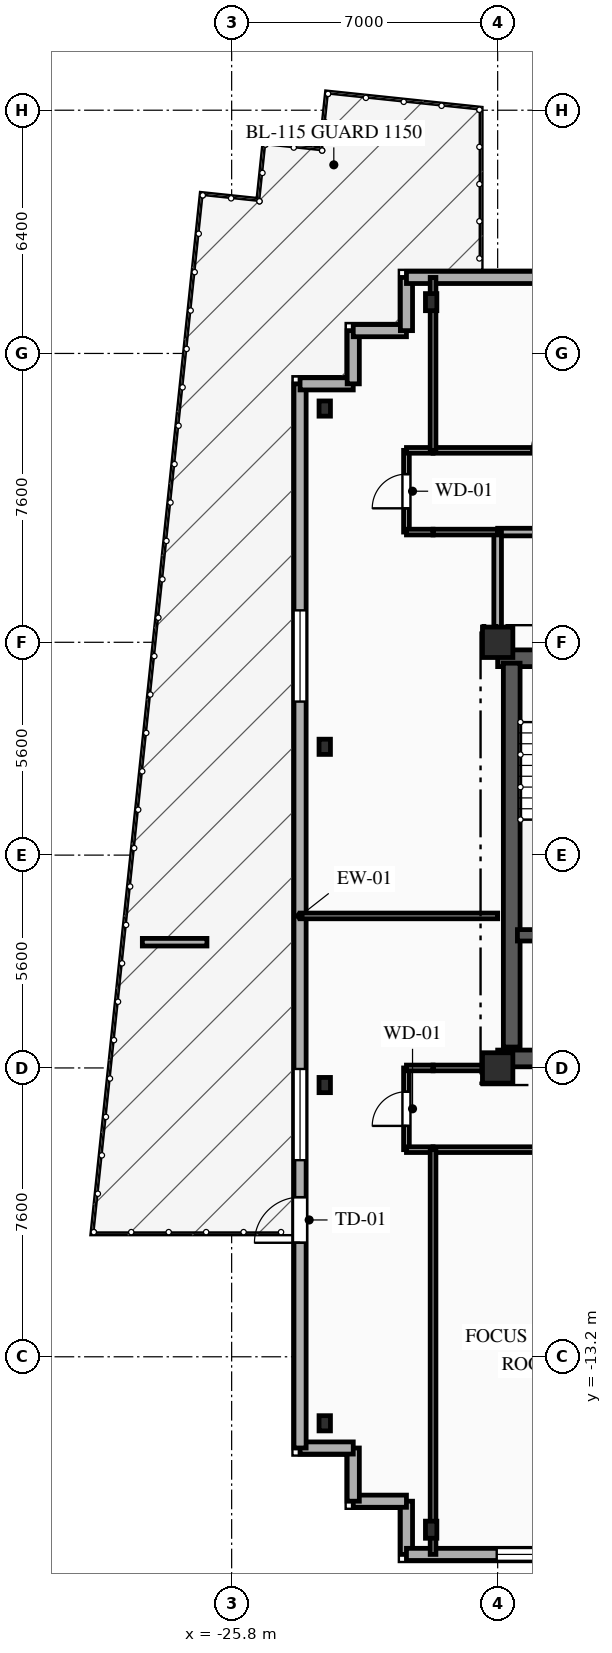
"""IFC4 building model, lengths in metres.
Left out: names, types, materials, properties, quantities, classifications, styles, units other than length and angle.
Written with IfcOpenShell. Run it as: python <this file> out.ifc"""

import sys

from ifc_helpers import new_model, si_unit, direction, frame, frame_2d, origin, origin_2d, place, context, subcontext, project, spatial, rectangle, i_section, extrude, element, fill, save


model = new_model("IFC4")
c1 = context("Model", 3, precision=1e-05, world=origin(), true_north=direction((0.0, 1.0)))
c2 = subcontext(c1, "Body", "Model", "MODEL_VIEW")
j1 = project(units=[si_unit("LENGTHUNIT", "METRE"), si_unit("PLANEANGLEUNIT", "RADIAN")], contexts=[c1])
p1 = place(None, origin())
s1 = spatial("IfcSite", under=j1, at=p1, CompositionType="ELEMENT")
p2 = place(p1, origin())
s2 = spatial("IfcBuilding", under=s1, at=p2, CompositionType="ELEMENT")
p3 = place(p2, frame((0.0, 0.0, 228.3)))
s3 = spatial("IfcBuildingStorey", under=s2, at=p3, CompositionType="ELEMENT", Elevation=228.3)
for number, where, z_axis, x_axis in (
    (1, (-18.8, -5.6, 0.0), (0.0, 0.0, 1.0), (1.0, 0.0, 0.0)),
    (2, (-18.8, 5.6, 0.0), (0.0, 0.0, 1.0), (1.0, 0.0, 0.0)),
):
    element("IfcColumn", number, at=place(p3, frame(where, z_axis=z_axis, x_axis=x_axis)), inside=s3, PredefinedType="COLUMN", context=c2, shape_type="SweptSolid", body=[
        extrude(rectangle(XDim=0.8, YDim=0.8, at=origin_2d()), origin(), (0.0, 0.0, 1.0), 3.35),
    ])
for number, where, z_axis, x_axis in (
    (3, (-20.55, -17.75, 0.0), (0.0, 0.0, 1.0), (1.0, 0.0, 0.0)),
    (4, (-20.55, 14.55, 0.0), (0.0, 0.0, 1.0), (1.0, 0.0, 0.0)),
):
    element("IfcColumn", number, at=place(p3, frame(where, z_axis=z_axis, x_axis=x_axis)), inside=s3, PredefinedType="COLUMN", context=c2, shape_type="SweptSolid", body=[
        extrude(i_section(OverallWidth=0.3, OverallDepth=0.45, WebThickness=0.014, FlangeThickness=0.026, FilletRadius=0.027, at=origin_2d()), origin(), (0.0, 0.0, 1.0), 3.35),
    ])
for number, where, z_axis, x_axis in (
    (5, (-23.35, 11.75, 0.0), (0.0, 0.0, 1.0), (1.0, 0.0, 0.0)),
    (6, (-23.35, 2.85, 0.0), (0.0, 0.0, 1.0), (1.0, 0.0, 0.0)),
    (7, (-23.35, -6.05, 0.0), (0.0, 0.0, 1.0), (1.0, 0.0, 0.0)),
    (8, (-23.35, -14.95, 0.0), (0.0, 0.0, 1.0), (1.0, 0.0, 0.0)),
):
    element("IfcColumn", number, at=place(p3, frame(where, z_axis=z_axis, x_axis=x_axis)), inside=s3, PredefinedType="COLUMN", context=c2, shape_type="SweptSolid", body=[
        extrude(i_section(OverallWidth=0.3, OverallDepth=0.4, WebThickness=0.013, FlangeThickness=0.024, FilletRadius=0.027, at=origin_2d()), origin(), (0.0, 0.0, 1.0), 3.35),
    ])
p4 = place(p3, frame((-21.2, -18.4, 0.0), z_axis=(0.0, 0.0, 1.0), x_axis=(0.0, 1.0, 0.0)))
e9 = element("IfcWall", 9, at=p4, inside=s3, PredefinedType="SOLIDWALL", context=c2, shape_type="SweptSolid", body=[
    extrude(rectangle(XDim=1.4, YDim=0.32, at=frame_2d((0.7, 0.0))), origin(), (0.0, 0.0, 1.0), 3.04),
])
p5 = place(p3, frame((-21.2, -17.0, 0.0), z_axis=(0.0, 0.0, 1.0), x_axis=(-1.0, 0.0, 0.0)))
e10 = element("IfcWall", 10, at=p5, inside=s3, PredefinedType="SOLIDWALL", context=c2, shape_type="SweptSolid", body=[
    extrude(rectangle(XDim=1.4, YDim=0.32, at=frame_2d((0.7, 0.0))), origin(), (0.0, 0.0, 1.0), 3.04),
])
for number, where, z_axis, x_axis in (
    (11, (-22.6, -17.0, 0.0), (0.0, 0.0, 1.0), (0.0, 1.0, 0.0)),
    (12, (-22.6, -15.6, 0.0), (0.0, 0.0, 1.0), (-1.0, 0.0, 0.0)),
):
    element("IfcWall", number, at=place(p3, frame(where, z_axis=z_axis, x_axis=x_axis)), inside=s3, PredefinedType="SOLIDWALL", context=c2, shape_type="SweptSolid", body=[
        extrude(rectangle(XDim=1.4, YDim=0.32, at=frame_2d((0.7, 0.0))), origin(), (0.0, 0.0, 1.0), 3.04),
    ])
p6 = place(p3, frame((-24.0, -15.6, 0.0), z_axis=(0.0, 0.0, 1.0), x_axis=(0.0, 1.0, 0.0)))
e13 = element("IfcWall", 13, at=p6, inside=s3, PredefinedType="SOLIDWALL", context=c2, shape_type="SweptSolid", body=[
    extrude(rectangle(XDim=28.0, YDim=0.32, at=frame_2d((14.0, 0.0))), origin(), (0.0, 0.0, 1.0), 3.04),
])
p7 = place(p6, frame((5.4, 0.0, 0.0)))
e14 = element("IfcOpeningElement", 14, at=p7, cuts=e13, PredefinedType="OPENING", context=c2, shape_type="SweptSolid", body=[
    extrude(rectangle(XDim=1.2, YDim=2.2, at=frame_2d((0.6, 1.1))), frame((0.0, 0.17, 0.0), z_axis=(0.0, -1.0, 0.0), x_axis=(1.0, 0.0, 0.0)), (0.0, 0.0, 1.0), 0.34),
])
p8 = place(p6, frame((7.573, 0.0, 0.85)))
e15 = element("IfcOpeningElement", 15, at=p8, cuts=e13, PredefinedType="OPENING", context=c2, shape_type="SweptSolid", body=[
    extrude(rectangle(XDim=2.4, YDim=1.95, at=frame_2d((1.2, 0.975))), frame((0.0, 0.17, 0.0), z_axis=(0.0, -1.0, 0.0), x_axis=(1.0, 0.0, 0.0)), (0.0, 0.0, 1.0), 0.34),
])
p9 = place(p6, frame((19.64, 0.0, 0.85)))
e16 = element("IfcOpeningElement", 16, at=p9, cuts=e13, PredefinedType="OPENING", context=c2, shape_type="SweptSolid", body=[
    extrude(rectangle(XDim=2.4, YDim=1.95, at=frame_2d((1.2, 0.975))), frame((0.0, 0.17, 0.0), z_axis=(0.0, -1.0, 0.0), x_axis=(1.0, 0.0, 0.0)), (0.0, 0.0, 1.0), 0.34),
])
p10 = place(p3, frame((-24.0, 12.4, 0.0), z_axis=(0.0, 0.0, 1.0), x_axis=(1.0, 0.0, 0.0)))
e17 = element("IfcWall", 17, at=p10, inside=s3, PredefinedType="SOLIDWALL", context=c2, shape_type="SweptSolid", body=[
    extrude(rectangle(XDim=1.4, YDim=0.32, at=frame_2d((0.7, 0.0))), origin(), (0.0, 0.0, 1.0), 3.04),
])
for number, where, z_axis, x_axis in (
    (18, (-22.6, 12.4, 0.0), (0.0, 0.0, 1.0), (0.0, 1.0, 0.0)),
    (19, (-22.6, 13.8, 0.0), (0.0, 0.0, 1.0), (1.0, 0.0, 0.0)),
):
    element("IfcWall", number, at=place(p3, frame(where, z_axis=z_axis, x_axis=x_axis)), inside=s3, PredefinedType="SOLIDWALL", context=c2, shape_type="SweptSolid", body=[
        extrude(rectangle(XDim=1.4, YDim=0.32, at=frame_2d((0.7, 0.0))), origin(), (0.0, 0.0, 1.0), 3.04),
    ])
p11 = place(p3, frame((-21.2, 13.8, 0.0), z_axis=(0.0, 0.0, 1.0), x_axis=(0.0, 1.0, 0.0)))
e20 = element("IfcWall", 20, at=p11, inside=s3, PredefinedType="SOLIDWALL", context=c2, shape_type="SweptSolid", body=[
    extrude(rectangle(XDim=1.4, YDim=0.32, at=frame_2d((0.7, 0.0))), origin(), (0.0, 0.0, 1.0), 3.04),
])
p12 = place(p3, frame((-21.2, 15.2, 0.0), z_axis=(0.0, 0.0, 1.0), x_axis=(1.0, 0.0, 0.0)))
e21 = element("IfcWall", 21, at=p12, inside=s3, PredefinedType="SOLIDWALL", context=c2, shape_type="SweptSolid", body=[
    extrude(rectangle(XDim=42.0, YDim=0.32, at=frame_2d((21.0, 0.0))), origin(), (0.0, 0.0, 1.0), 3.04),
])
p13 = place(p12, frame((5.015, 0.0, 0.85)))
e22 = element("IfcOpeningElement", 22, at=p13, cuts=e21, PredefinedType="OPENING", context=c2, shape_type="SweptSolid", body=[
    extrude(rectangle(XDim=1.65, YDim=1.85, at=frame_2d((0.825, 0.925))), frame((0.0, 0.17, 0.0), z_axis=(0.0, -1.0, 0.0), x_axis=(1.0, 0.0, 0.0)), (0.0, 0.0, 1.0), 0.34),
])
p14 = place(p12, frame((16.53, 0.0, 0.85)))
e23 = element("IfcOpeningElement", 23, at=p14, cuts=e21, PredefinedType="OPENING", context=c2, shape_type="SweptSolid", body=[
    extrude(rectangle(XDim=1.5, YDim=1.85, at=frame_2d((0.75, 0.925))), frame((0.0, 0.17, 0.0), z_axis=(0.0, -1.0, 0.0), x_axis=(1.0, 0.0, 0.0)), (0.0, 0.0, 1.0), 0.34),
])
p15 = place(p12, frame((25.575, 0.0, 0.85)))
e24 = element("IfcOpeningElement", 24, at=p15, cuts=e21, PredefinedType="OPENING", context=c2, shape_type="SweptSolid", body=[
    extrude(rectangle(XDim=1.65, YDim=1.85, at=frame_2d((0.825, 0.925))), frame((0.0, 0.17, 0.0), z_axis=(0.0, -1.0, 0.0), x_axis=(1.0, 0.0, 0.0)), (0.0, 0.0, 1.0), 0.34),
])
p16 = place(p12, frame((35.735, 0.0, 0.85)))
e25 = element("IfcOpeningElement", 25, at=p16, cuts=e21, PredefinedType="OPENING", context=c2, shape_type="SweptSolid", body=[
    extrude(rectangle(XDim=1.65, YDim=1.85, at=frame_2d((0.825, 0.925))), frame((0.0, 0.17, 0.0), z_axis=(0.0, -1.0, 0.0), x_axis=(1.0, 0.0, 0.0)), (0.0, 0.0, 1.0), 0.34),
])
p17 = place(p3, frame((20.8, -18.4, 0.0), z_axis=(0.0, 0.0, 1.0), x_axis=(-1.0, 0.0, 0.0)))
e26 = element("IfcWall", 26, at=p17, inside=s3, PredefinedType="SOLIDWALL", context=c2, shape_type="SweptSolid", body=[
    extrude(rectangle(XDim=42.0, YDim=0.32, at=frame_2d((21.0, 0.0))), origin(), (0.0, 0.0, 1.0), 3.04),
])
p18 = place(p17, frame((2.135, 0.0, 0.85)))
e27 = element("IfcOpeningElement", 27, at=p18, cuts=e26, PredefinedType="OPENING", context=c2, shape_type="SweptSolid", body=[
    extrude(rectangle(XDim=1.65, YDim=1.85, at=frame_2d((0.825, 0.925))), frame((0.0, 0.17, 0.0), z_axis=(0.0, -1.0, 0.0), x_axis=(1.0, 0.0, 0.0)), (0.0, 0.0, 1.0), 0.34),
])
p19 = place(p17, frame((7.175, 0.0, 0.85)))
e28 = element("IfcOpeningElement", 28, at=p19, cuts=e26, PredefinedType="OPENING", context=c2, shape_type="SweptSolid", body=[
    extrude(rectangle(XDim=1.65, YDim=1.85, at=frame_2d((0.825, 0.925))), frame((0.0, 0.17, 0.0), z_axis=(0.0, -1.0, 0.0), x_axis=(1.0, 0.0, 0.0)), (0.0, 0.0, 1.0), 0.34),
])
p20 = place(p17, frame((14.58, 0.0, 0.85)))
e29 = element("IfcOpeningElement", 29, at=p20, cuts=e26, PredefinedType="OPENING", context=c2, shape_type="SweptSolid", body=[
    extrude(rectangle(XDim=2.2, YDim=1.85, at=frame_2d((1.1, 0.925))), frame((0.0, 0.17, 0.0), z_axis=(0.0, -1.0, 0.0), x_axis=(1.0, 0.0, 0.0)), (0.0, 0.0, 1.0), 0.34),
])
p21 = place(p17, frame((24.9, 0.0, 0.85)))
e30 = element("IfcOpeningElement", 30, at=p21, cuts=e26, PredefinedType="OPENING", context=c2, shape_type="SweptSolid", body=[
    extrude(rectangle(XDim=2.2, YDim=1.85, at=frame_2d((1.1, 0.925))), frame((0.0, 0.17, 0.0), z_axis=(0.0, -1.0, 0.0), x_axis=(1.0, 0.0, 0.0)), (0.0, 0.0, 1.0), 0.34),
])
p22 = place(p17, frame((32.855, 0.0, 0.85)))
e31 = element("IfcOpeningElement", 31, at=p22, cuts=e26, PredefinedType="OPENING", context=c2, shape_type="SweptSolid", body=[
    extrude(rectangle(XDim=1.65, YDim=1.85, at=frame_2d((0.825, 0.925))), frame((0.0, 0.17, 0.0), z_axis=(0.0, -1.0, 0.0), x_axis=(1.0, 0.0, 0.0)), (0.0, 0.0, 1.0), 0.34),
])
p23 = place(p17, frame((37.975, 0.0, 0.85)))
e32 = element("IfcOpeningElement", 32, at=p23, cuts=e26, PredefinedType="OPENING", context=c2, shape_type="SweptSolid", body=[
    extrude(rectangle(XDim=1.65, YDim=1.85, at=frame_2d((0.825, 0.925))), frame((0.0, 0.17, 0.0), z_axis=(0.0, -1.0, 0.0), x_axis=(1.0, 0.0, 0.0)), (0.0, 0.0, 1.0), 0.34),
])
p24 = place(p3, frame((-28.15, -2.292, 0.0), z_axis=(0.0, 0.0, 1.0), x_axis=(1.0, 0.0, 0.0)))
e33 = element("IfcWall", 33, at=p24, inside=s3, PredefinedType="USERDEFINED", context=c2, shape_type="SweptSolid", body=[
    extrude(rectangle(XDim=1.7, YDim=0.2, at=frame_2d((0.85, 0.0))), origin(), (0.0, 0.0, 1.0), 0.45),
])
p25 = place(p3, frame((-18.8, 5.18, 0.0), z_axis=(0.0, 0.0, 1.0), x_axis=(1.0, 0.0, 0.0)))
e34 = element("IfcWall", 34, at=p25, inside=s3, PredefinedType="SHEAR", context=c2, shape_type="SweptSolid", body=[
    extrude(rectangle(XDim=9.6, YDim=0.44, at=frame_2d((4.8, 0.0))), origin(), (0.0, 0.0, 1.0), 3.04),
])
p26 = place(p25, frame((1.55, 0.0, 0.0)))
e35 = element("IfcOpeningElement", 35, at=p26, cuts=e34, PredefinedType="OPENING", context=c2, shape_type="SweptSolid", body=[
    extrude(rectangle(XDim=1.1, YDim=2.15, at=frame_2d((0.55, 1.075))), frame((0.0, 0.23, 0.0), z_axis=(0.0, -1.0, 0.0), x_axis=(1.0, 0.0, 0.0)), (0.0, 0.0, 1.0), 0.46),
])
p27 = place(p25, frame((4.775, 0.0, 0.0)))
e36 = element("IfcOpeningElement", 36, at=p27, cuts=e34, PredefinedType="OPENING", context=c2, shape_type="SweptSolid", body=[
    extrude(rectangle(XDim=1.05, YDim=2.1, at=frame_2d((0.525, 1.05))), frame((0.0, 0.23, 0.0), z_axis=(0.0, -1.0, 0.0), x_axis=(1.0, 0.0, 0.0)), (0.0, 0.0, 1.0), 0.46),
])
p28 = place(p3, frame((-18.8, -5.35, 0.0), z_axis=(0.0, 0.0, 1.0), x_axis=(1.0, 0.0, 0.0)))
e37 = element("IfcWall", 37, at=p28, inside=s3, PredefinedType="SHEAR", context=c2, shape_type="SweptSolid", body=[
    extrude(rectangle(XDim=9.6, YDim=0.44, at=frame_2d((4.8, 0.0))), origin(), (0.0, 0.0, 1.0), 3.04),
])
p29 = place(p28, frame((1.05, 0.0, 0.0)))
e38 = element("IfcOpeningElement", 38, at=p29, cuts=e37, PredefinedType="OPENING", context=c2, shape_type="SweptSolid", body=[
    extrude(rectangle(XDim=0.9, YDim=2.1, at=frame_2d((0.45, 1.05))), frame((0.0, 0.23, 0.0), z_axis=(0.0, -1.0, 0.0), x_axis=(1.0, 0.0, 0.0)), (0.0, 0.0, 1.0), 0.46),
])
p30 = place(p3, frame((-18.43, -5.05, 0.0), z_axis=(0.0, 0.0, 1.0), x_axis=(0.0, 1.0, 0.0)))
e39 = element("IfcWall", 39, at=p30, inside=s3, PredefinedType="SHEAR", context=c2, shape_type="SweptSolid", body=[
    extrude(rectangle(XDim=10.1, YDim=0.44, at=frame_2d((5.05, 0.0))), origin(), (0.0, 0.0, 1.0), 3.04),
])
p31 = place(p3, frame((-18.28, -2.11, 0.0), z_axis=(0.0, 0.0, 1.0), x_axis=(1.0, 0.0, 0.0)))
e40 = element("IfcWall", 40, at=p31, inside=s3, PredefinedType="SHEAR", context=c2, shape_type="SweptSolid", body=[
    extrude(rectangle(XDim=3.18, YDim=0.3, at=frame_2d((1.59, 0.0))), origin(), (0.0, 0.0, 1.0), 3.04),
])
p32 = place(p3, frame((-12.0, 8.5, 0.0), z_axis=(0.0, 0.0, 1.0), x_axis=(-1.0, 0.0, 0.0)))
e41 = element("IfcWall", 41, at=p32, inside=s3, PredefinedType="PARTITIONING", context=c2, shape_type="SweptSolid", body=[
    extrude(rectangle(XDim=6.8, YDim=0.2, at=frame_2d((3.4, 0.0))), origin(), (0.0, 0.0, 1.0), 3.04),
])
p33 = place(p32, frame((1.715, 0.0, 0.0)))
e42 = element("IfcOpeningElement", 42, at=p33, cuts=e41, PredefinedType="OPENING", context=c2, shape_type="SweptSolid", body=[
    extrude(rectangle(XDim=1.1, YDim=2.15, at=frame_2d((0.55, 1.075))), frame((0.0, 0.11, 0.0), z_axis=(0.0, -1.0, 0.0), x_axis=(1.0, 0.0, 0.0)), (0.0, 0.0, 1.0), 0.22),
])
p34 = place(p3, frame((-18.8, 8.5, 0.0), z_axis=(0.0, 0.0, 1.0), x_axis=(0.0, -1.0, 0.0)))
e43 = element("IfcWall", 43, at=p34, inside=s3, PredefinedType="PARTITIONING", context=c2, shape_type="SweptSolid", body=[
    extrude(rectangle(XDim=2.9, YDim=0.2, at=frame_2d((1.45, 0.0))), origin(), (0.0, 0.0, 1.0), 2.665),
])
p35 = place(p3, frame((-21.2, 8.5, 0.0), z_axis=(0.0, 0.0, 1.0), x_axis=(0.0, 1.0, 0.0)))
e44 = element("IfcWall", 44, at=p35, inside=s3, PredefinedType="PARTITIONING", context=c2, shape_type="SweptSolid", body=[
    extrude(rectangle(XDim=2.15, YDim=0.15, at=frame_2d((1.075, 0.0))), origin(), (0.0, 0.0, 1.0), 2.695),
])
p36 = place(p35, frame((0.625, 0.0, 0.0)))
e45 = element("IfcOpeningElement", 45, at=p36, cuts=e44, PredefinedType="OPENING", context=c2, shape_type="SweptSolid", body=[
    extrude(rectangle(XDim=0.9, YDim=2.1, at=frame_2d((0.45, 1.05))), frame((0.0, 0.085, 0.0), z_axis=(0.0, -1.0, 0.0), x_axis=(1.0, 0.0, 0.0)), (0.0, 0.0, 1.0), 0.17),
])
p37 = place(p3, frame((-18.8, 8.5, 0.0), z_axis=(0.0, 0.0, 1.0), x_axis=(-1.0, 0.0, 0.0)))
e46 = element("IfcWall", 46, at=p37, inside=s3, PredefinedType="PARTITIONING", context=c2, shape_type="SweptSolid", body=[
    extrude(rectangle(XDim=1.7, YDim=0.15, at=frame_2d((0.85, 0.0))), origin(), (0.0, 0.0, 1.0), 3.04),
])
for number, where, z_axis, x_axis in (
    (47, (-20.5, 8.5, 0.0), (0.0, 0.0, 1.0), (-1.0, 0.0, 0.0)),
    (48, (-21.2, 10.65, 0.0), (0.0, 0.0, 1.0), (1.0, 0.0, 0.0)),
):
    element("IfcWall", number, at=place(p3, frame(where, z_axis=z_axis, x_axis=x_axis)), inside=s3, PredefinedType="PARTITIONING", context=c2, shape_type="SweptSolid", body=[
        extrude(rectangle(XDim=0.7, YDim=0.15, at=frame_2d((0.35, 0.0))), origin(), (0.0, 0.0, 1.0), 3.04),
    ])
p38 = place(p3, frame((-20.5, 10.65, 0.0), z_axis=(0.0, 0.0, 1.0), x_axis=(1.0, 0.0, 0.0)))
e49 = element("IfcWall", 49, at=p38, inside=s3, PredefinedType="PARTITIONING", context=c2, shape_type="SweptSolid", body=[
    extrude(rectangle(XDim=10.25, YDim=0.15, at=frame_2d((5.125, 0.0))), origin(), (0.0, 0.0, 1.0), 3.04),
])
p39 = place(p38, frame((2.59, 0.0, 0.0)))
e50 = element("IfcOpeningElement", 50, at=p39, cuts=e49, PredefinedType="OPENING", context=c2, shape_type="SweptSolid", body=[
    extrude(rectangle(XDim=1.05, YDim=2.15, at=frame_2d((0.525, 1.075))), frame((0.0, 0.085, 0.0), z_axis=(0.0, -1.0, 0.0), x_axis=(1.0, 0.0, 0.0)), (0.0, 0.0, 1.0), 0.17),
])
p40 = place(p3, frame((-21.2, -7.75, 0.0), z_axis=(0.0, 0.0, 1.0), x_axis=(0.0, 1.0, 0.0)))
e51 = element("IfcWall", 51, at=p40, inside=s3, PredefinedType="PARTITIONING", context=c2, shape_type="SweptSolid", body=[
    extrude(rectangle(XDim=2.15, YDim=0.15, at=frame_2d((1.075, 0.0))), origin(), (0.0, 0.0, 1.0), 2.695),
])
p41 = place(p40, frame((0.625, 0.0, 0.0)))
e52 = element("IfcOpeningElement", 52, at=p41, cuts=e51, PredefinedType="OPENING", context=c2, shape_type="SweptSolid", body=[
    extrude(rectangle(XDim=0.9, YDim=2.1, at=frame_2d((0.45, 1.05))), frame((0.0, 0.085, 0.0), z_axis=(0.0, -1.0, 0.0), x_axis=(1.0, 0.0, 0.0)), (0.0, 0.0, 1.0), 0.17),
])
p42 = place(p3, frame((-20.5, -5.6, 0.0), z_axis=(0.0, 0.0, 1.0), x_axis=(1.0, 0.0, 0.0)))
e53 = element("IfcWall", 53, at=p42, inside=s3, PredefinedType="PARTITIONING", context=c2, shape_type="SweptSolid", body=[
    extrude(rectangle(XDim=1.7, YDim=0.15, at=frame_2d((0.85, 0.0))), origin(), (0.0, 0.0, 1.0), 3.04),
])
for number, where, z_axis, x_axis in (
    (54, (-20.5, -7.75, 0.0), (0.0, 0.0, 1.0), (-1.0, 0.0, 0.0)),
    (55, (-21.2, -5.6, 0.0), (0.0, 0.0, 1.0), (1.0, 0.0, 0.0)),
):
    element("IfcWall", number, at=place(p3, frame(where, z_axis=z_axis, x_axis=x_axis)), inside=s3, PredefinedType="PARTITIONING", context=c2, shape_type="SweptSolid", body=[
        extrude(rectangle(XDim=0.7, YDim=0.15, at=frame_2d((0.35, 0.0))), origin(), (0.0, 0.0, 1.0), 3.04),
    ])
p43 = place(p3, frame((-15.375, -7.75, 0.0), z_axis=(0.0, 0.0, 1.0), x_axis=(-1.0, 0.0, 0.0)))
e56 = element("IfcWall", 56, at=p43, inside=s3, PredefinedType="PARTITIONING", context=c2, shape_type="SweptSolid", body=[
    extrude(rectangle(XDim=5.125, YDim=0.15, at=frame_2d((2.562, 0.0))), origin(), (0.0, 0.0, 1.0), 3.04),
])
p44 = place(p43, frame((0.944, 0.0, 0.0)))
e57 = element("IfcOpeningElement", 57, at=p44, cuts=e56, PredefinedType="OPENING", context=c2, shape_type="SweptSolid", body=[
    extrude(rectangle(XDim=1.05, YDim=2.15, at=frame_2d((0.525, 1.075))), frame((0.0, 0.085, 0.0), z_axis=(0.0, -1.0, 0.0), x_axis=(1.0, 0.0, 0.0)), (0.0, 0.0, 1.0), 0.17),
])
p45 = place(p3, frame((-24.0, -1.6, 0.0), z_axis=(0.0, 0.0, 1.0), x_axis=(1.0, 0.0, 0.0)))
e58 = element("IfcWall", 58, at=p45, inside=s3, PredefinedType="PARTITIONING", context=c2, shape_type="SweptSolid", body=[
    extrude(rectangle(XDim=5.2, YDim=0.15, at=frame_2d((2.6, 0.0))), origin(), (0.0, 0.0, 1.0), 3.04),
])
p46 = place(p3, frame((-20.5, -7.75, 0.0), z_axis=(0.0, 0.0, 1.0), x_axis=(0.0, -1.0, 0.0)))
e59 = element("IfcWall", 59, at=p46, inside=s3, PredefinedType="PARTITIONING", context=c2, shape_type="SweptSolid", body=[
    extrude(rectangle(XDim=10.65, YDim=0.15, at=frame_2d((5.325, 0.0))), origin(), (0.0, 0.0, 1.0), 2.665),
])
p47 = place(p3, frame((-20.5, 15.2, 0.0), z_axis=(0.0, 0.0, 1.0), x_axis=(0.0, -1.0, 0.0)))
e60 = element("IfcWall", 60, at=p47, inside=s3, PredefinedType="PARTITIONING", context=c2, shape_type="SweptSolid", body=[
    extrude(rectangle(XDim=4.55, YDim=0.15, at=frame_2d((2.275, 0.0))), origin(), (0.0, 0.0, 1.0), 2.665),
])
p48 = place(p7, origin())
e61 = element("IfcDoor", 61, at=p48, inside=s3, OperationType="SINGLE_SWING_LEFT", PredefinedType="DOOR", context=c2, shape_type="SweptSolid", body=[
    extrude(rectangle(XDim=1.2, YDim=2.2, at=frame_2d((0.6, 1.1))), frame((0.0, 0.025, 0.0), z_axis=(0.0, -1.0, 0.0), x_axis=(1.0, 0.0, 0.0)), (0.0, 0.0, 1.0), 0.05),
])
fill(e14, e61)
p49 = place(p8, origin())
e62 = element("IfcWindow", 62, at=p49, inside=s3, PartitioningType="SINGLE_PANEL", PredefinedType="WINDOW", context=c2, shape_type="SweptSolid", body=[
    extrude(rectangle(XDim=2.4, YDim=1.95, at=frame_2d((1.2, 0.975))), frame((0.0, 0.03, 0.0), z_axis=(0.0, -1.0, 0.0), x_axis=(1.0, 0.0, 0.0)), (0.0, 0.0, 1.0), 0.06),
])
fill(e15, e62)
p50 = place(p9, origin())
e63 = element("IfcWindow", 63, at=p50, inside=s3, PartitioningType="SINGLE_PANEL", PredefinedType="WINDOW", context=c2, shape_type="SweptSolid", body=[
    extrude(rectangle(XDim=2.4, YDim=1.95, at=frame_2d((1.2, 0.975))), frame((0.0, 0.03, 0.0), z_axis=(0.0, -1.0, 0.0), x_axis=(1.0, 0.0, 0.0)), (0.0, 0.0, 1.0), 0.06),
])
fill(e16, e63)
p51 = place(p23, origin())
e64 = element("IfcWindow", 64, at=p51, inside=s3, PartitioningType="SINGLE_PANEL", PredefinedType="WINDOW", context=c2, shape_type="SweptSolid", body=[
    extrude(rectangle(XDim=1.65, YDim=1.85, at=frame_2d((0.825, 0.925))), frame((0.0, 0.03, 0.0), z_axis=(0.0, -1.0, 0.0), x_axis=(1.0, 0.0, 0.0)), (0.0, 0.0, 1.0), 0.06),
])
fill(e32, e64)
p52 = place(p36, origin())
e65 = element("IfcDoor", 65, at=p52, inside=s3, OperationType="SINGLE_SWING_LEFT", PredefinedType="DOOR", context=c2, shape_type="SweptSolid", body=[
    extrude(rectangle(XDim=0.9, YDim=2.1, at=frame_2d((0.45, 1.05))), frame((0.0, 0.025, 0.0), z_axis=(0.0, -1.0, 0.0), x_axis=(1.0, 0.0, 0.0)), (0.0, 0.0, 1.0), 0.05),
])
fill(e45, e65)
p53 = place(p39, origin())
e66 = element("IfcDoor", 66, at=p53, inside=s3, OperationType="SINGLE_SWING_RIGHT", PredefinedType="DOOR", context=c2, shape_type="SweptSolid", body=[
    extrude(rectangle(XDim=1.05, YDim=2.15, at=frame_2d((0.525, 1.075))), frame((0.0, 0.025, 0.0), z_axis=(0.0, -1.0, 0.0), x_axis=(1.0, 0.0, 0.0)), (0.0, 0.0, 1.0), 0.05),
])
fill(e50, e66)
p54 = place(p41, origin())
e67 = element("IfcDoor", 67, at=p54, inside=s3, OperationType="SINGLE_SWING_LEFT", PredefinedType="DOOR", context=c2, shape_type="SweptSolid", body=[
    extrude(rectangle(XDim=0.9, YDim=2.1, at=frame_2d((0.45, 1.05))), frame((0.0, 0.025, 0.0), z_axis=(0.0, -1.0, 0.0), x_axis=(1.0, 0.0, 0.0)), (0.0, 0.0, 1.0), 0.05),
])
fill(e52, e67)
save(model, sys.argv[1])
